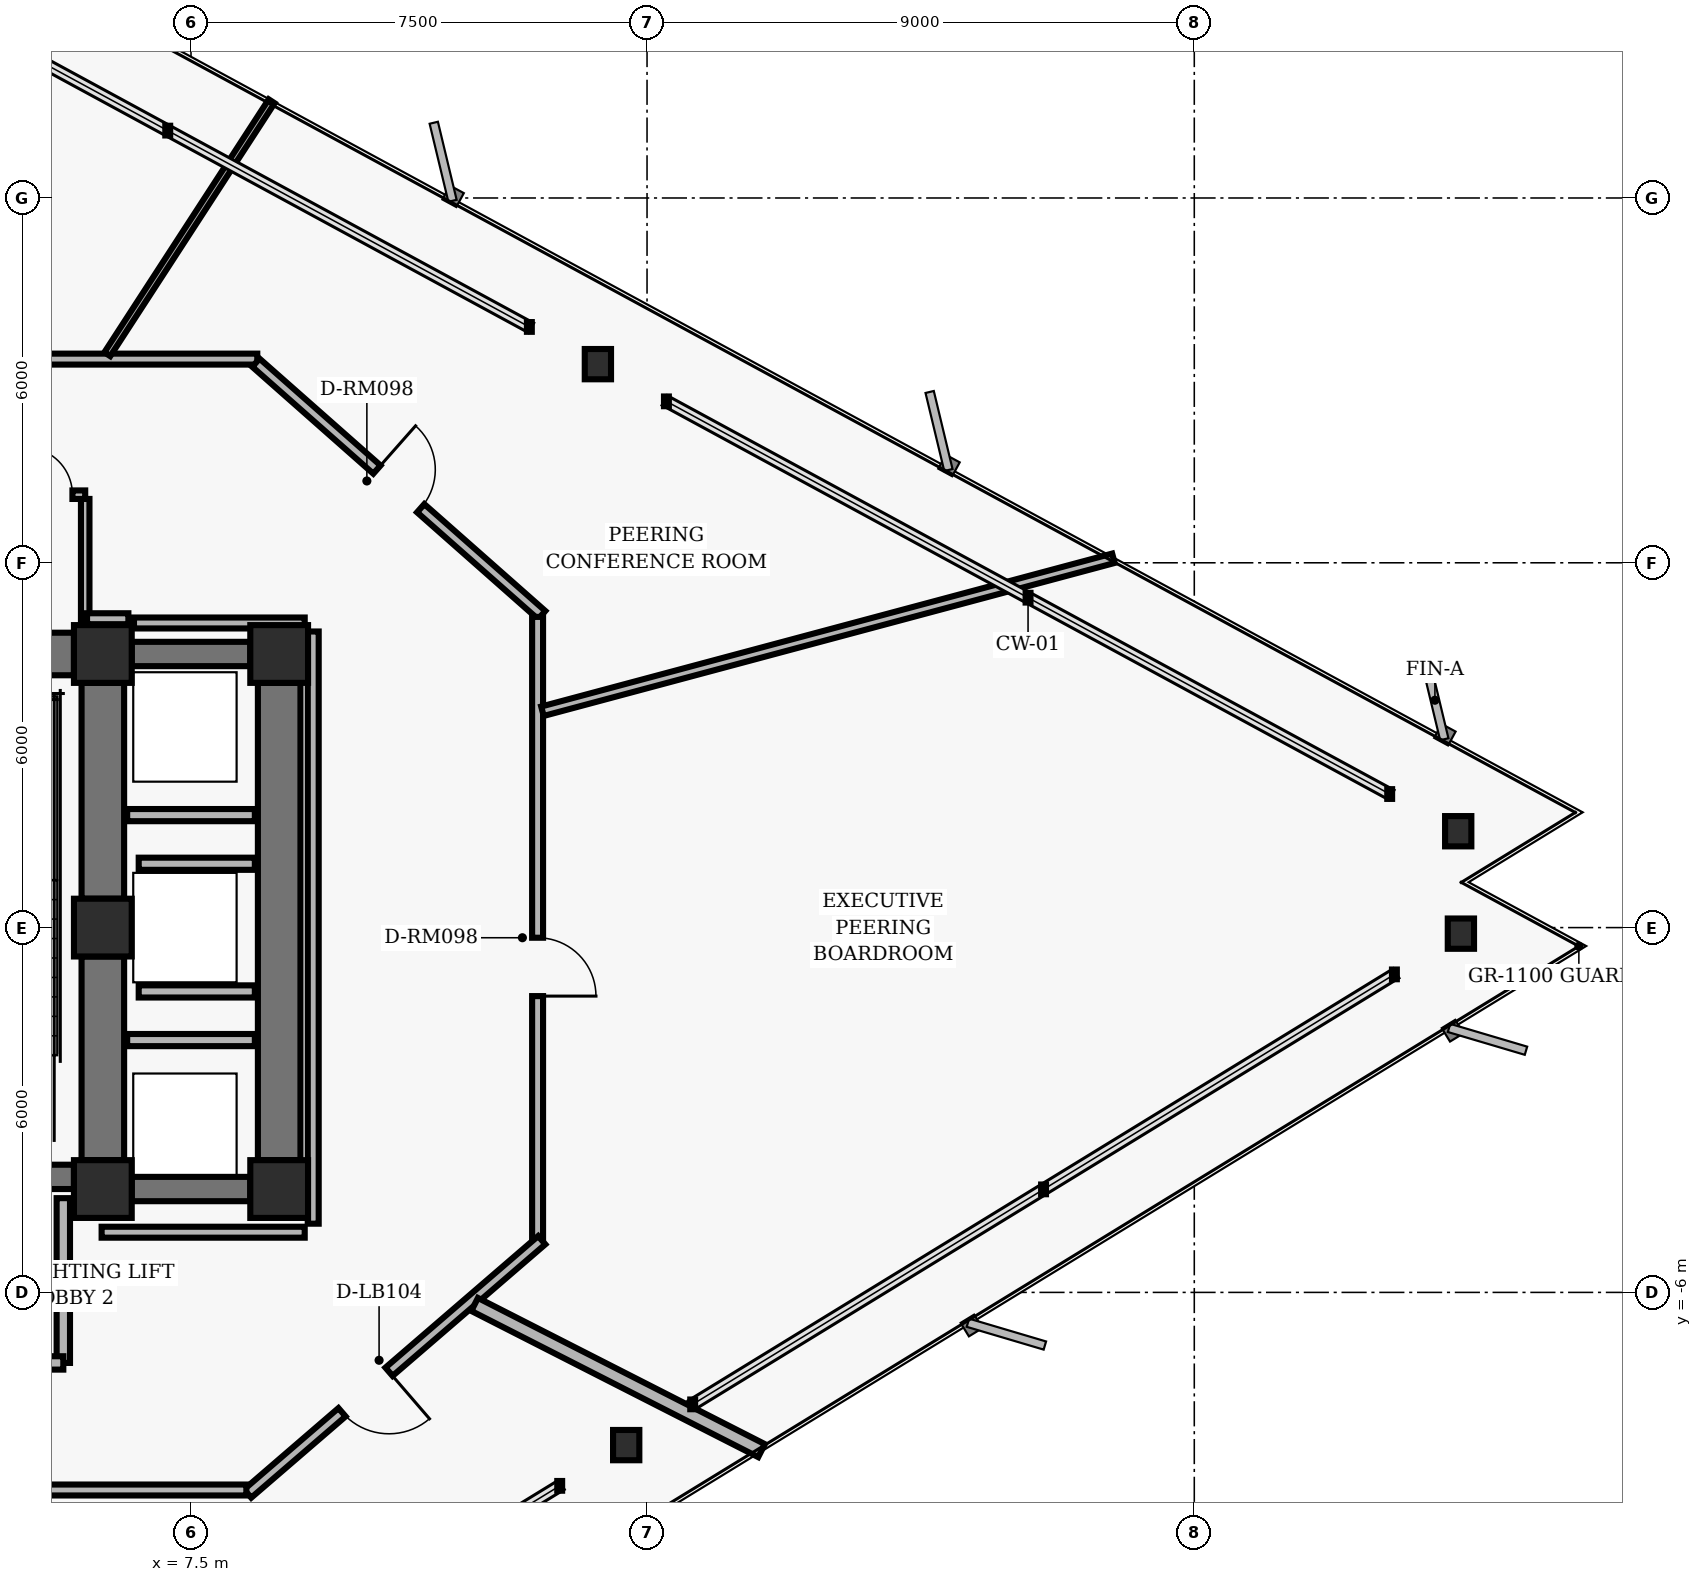
"""IFC4 building model, lengths in metres.
Left out: names, types, materials, properties, quantities, classifications, styles, units other than length and angle.
Written with IfcOpenShell. Run it as: python <this file> out.ifc"""

import sys

from ifc_helpers import new_model, si_unit, direction, frame, frame_2d, origin, origin_2d, place, context, subcontext, project, spatial, rectangle, hollow_rectangle, i_section, extrude, element, fill, save


model = new_model("IFC4")
c1 = context("Model", 3, precision=1e-05, world=origin(), true_north=direction((0.0, 1.0)))
c2 = subcontext(c1, "Body", "Model", "MODEL_VIEW")
j1 = project(units=[si_unit("LENGTHUNIT", "METRE"), si_unit("PLANEANGLEUNIT", "RADIAN")], contexts=[c1])
p1 = place(None, origin())
s1 = spatial("IfcSite", under=j1, at=p1, CompositionType="ELEMENT")
p2 = place(p1, origin())
s2 = spatial("IfcBuilding", under=s1, at=p2, CompositionType="ELEMENT")
p3 = place(p2, frame((0.0, 0.0, 28.96)))
s3 = spatial("IfcBuildingStorey", under=s2, at=p3, CompositionType="ELEMENT", Elevation=28.96)
for number, where, z_axis, x_axis in (
    (1, (6.05, 4.5, 0.0), (0.0, 0.0, 1.0), (1.0, 0.0, 0.0)),
    (2, (6.05, 0.0, 0.0), (0.0, 0.0, 1.0), (1.0, 0.0, 0.0)),
    (3, (6.05, -4.3, 0.0), (0.0, 0.0, 1.0), (1.0, 0.0, 0.0)),
    (4, (8.95, 4.5, 0.0), (0.0, 0.0, 1.0), (1.0, 0.0, 0.0)),
    (5, (8.95, -4.3, 0.0), (0.0, 0.0, 1.0), (1.0, 0.0, 0.0)),
):
    element("IfcColumn", number, at=place(p3, frame(where, z_axis=z_axis, x_axis=x_axis)), inside=s3, PredefinedType="COLUMN", context=c2, shape_type="SweptSolid", body=[
        extrude(hollow_rectangle(XDim=0.95, YDim=0.95, WallThickness=0.06, InnerFilletRadius=0.02, OuterFilletRadius=0.04, at=origin_2d()), origin(), (0.0, 0.0, 1.0), 3.36),
    ])
p4 = place(p3, frame((6.05, 0.475, 0.0), z_axis=(0.0, 0.0, 1.0), x_axis=(0.0, 1.0, 0.0)))
e6 = element("IfcWall", 6, at=p4, inside=s3, PredefinedType="SHEAR", context=c2, shape_type="SweptSolid", body=[
    extrude(rectangle(XDim=3.55, YDim=0.7, at=frame_2d((1.775, 0.0))), origin(), (0.0, 0.0, 1.0), 3.098),
])
p5 = place(p3, frame((6.05, -3.825, 0.0), z_axis=(0.0, 0.0, 1.0), x_axis=(0.0, 1.0, 0.0)))
e7 = element("IfcWall", 7, at=p5, inside=s3, PredefinedType="SHEAR", context=c2, shape_type="SweptSolid", body=[
    extrude(rectangle(XDim=3.35, YDim=0.7, at=frame_2d((1.675, 0.0))), origin(), (0.0, 0.0, 1.0), 3.098),
])
p6 = place(p3, frame((-5.575, -4.1, 0.0), z_axis=(0.0, 0.0, 1.0), x_axis=(1.0, 0.0, 0.0)))
e8 = element("IfcWall", 8, at=p6, inside=s3, PredefinedType="SHEAR", context=c2, shape_type="SweptSolid", body=[
    extrude(rectangle(XDim=11.15, YDim=0.4, at=frame_2d((5.575, 0.0))), origin(), (0.0, 0.0, 1.0), 3.098),
])
p7 = place(p6, frame((1.305, 0.0, 0.0)))
e9 = element("IfcOpeningElement", 9, at=p7, cuts=e8, PredefinedType="OPENING", context=c2, shape_type="SweptSolid", body=[
    extrude(rectangle(XDim=1.1, YDim=2.04, at=frame_2d((0.55, 1.02))), frame((0.0, 0.21, 0.0), z_axis=(0.0, -1.0, 0.0), x_axis=(1.0, 0.0, 0.0)), (0.0, 0.0, 1.0), 0.42),
])
p8 = place(p6, frame((8.745, 0.0, 0.0)))
e10 = element("IfcOpeningElement", 10, at=p8, cuts=e8, PredefinedType="OPENING", context=c2, shape_type="SweptSolid", body=[
    extrude(rectangle(XDim=1.1, YDim=2.04, at=frame_2d((0.55, 1.02))), frame((0.0, 0.21, 0.0), z_axis=(0.0, -1.0, 0.0), x_axis=(1.0, 0.0, 0.0)), (0.0, 0.0, 1.0), 0.42),
])
p9 = place(p6, frame((4.045, 0.0, 0.0)))
e11 = element("IfcOpeningElement", 11, at=p9, cuts=e8, PredefinedType="OPENING", context=c2, shape_type="SweptSolid", body=[
    extrude(rectangle(XDim=1.06, YDim=2.04, at=frame_2d((0.53, 1.02))), frame((0.0, 0.21, 0.0), z_axis=(0.0, -1.0, 0.0), x_axis=(1.0, 0.0, 0.0)), (0.0, 0.0, 1.0), 0.42),
])
p10 = place(p6, frame((6.045, 0.0, 0.0)))
e12 = element("IfcOpeningElement", 12, at=p10, cuts=e8, PredefinedType="OPENING", context=c2, shape_type="SweptSolid", body=[
    extrude(rectangle(XDim=1.06, YDim=2.04, at=frame_2d((0.53, 1.02))), frame((0.0, 0.21, 0.0), z_axis=(0.0, -1.0, 0.0), x_axis=(1.0, 0.0, 0.0)), (0.0, 0.0, 1.0), 0.42),
])
p11 = place(p3, frame((2.05, 4.5, 0.0), z_axis=(0.0, 0.0, 1.0), x_axis=(1.0, 0.0, 0.0)))
e13 = element("IfcWall", 13, at=p11, inside=s3, PredefinedType="SHEAR", context=c2, shape_type="SweptSolid", body=[
    extrude(rectangle(XDim=3.525, YDim=0.7, at=frame_2d((1.762, 0.0))), origin(), (0.0, 0.0, 1.0), 3.098),
])
p12 = place(p3, frame((8.95, -3.825, 0.0), z_axis=(0.0, 0.0, 1.0), x_axis=(0.0, 1.0, 0.0)))
e14 = element("IfcWall", 14, at=p12, inside=s3, PredefinedType="SHEAR", context=c2, shape_type="SweptSolid", body=[
    extrude(rectangle(XDim=7.85, YDim=0.7, at=frame_2d((3.925, 0.0))), origin(), (0.0, 0.0, 1.0), 3.098),
])
for number, where, z_axis, x_axis in (
    (15, (6.525, 4.5, 0.0), (0.0, 0.0, 1.0), (1.0, 0.0, 0.0)),
    (16, (6.525, -4.3, 0.0), (0.0, 0.0, 1.0), (1.0, 0.0, 0.0)),
):
    element("IfcWall", number, at=place(p3, frame(where, z_axis=z_axis, x_axis=x_axis)), inside=s3, PredefinedType="SHEAR", context=c2, shape_type="SweptSolid", body=[
        extrude(rectangle(XDim=1.95, YDim=0.4, at=frame_2d((0.975, 0.0))), origin(), (0.0, 0.0, 1.0), 3.098),
    ])
for number, where, z_axis, x_axis in (
    (17, (28.341, 1.585, 0.0), (0.0, 0.0, 1.0), (1.0, 0.0, 0.0)),
    (18, (14.192, 9.267, 0.0), (0.0, 0.0, 1.0), (1.0, 0.0, 0.0)),
    (19, (14.657, -8.512, 0.0), (0.0, 0.0, 1.0), (1.0, 0.0, 0.0)),
    (20, (28.385, -0.1, 0.0), (0.0, 0.0, 1.0), (1.0, 0.0, 0.0)),
):
    element("IfcColumn", number, at=place(p3, frame(where, z_axis=z_axis, x_axis=x_axis)), inside=s3, PredefinedType="COLUMN", context=c2, shape_type="SweptSolid", body=[
        extrude(i_section(OverallWidth=0.432, OverallDepth=0.498, WebThickness=0.056, FlangeThickness=0.089, FilletRadius=0.025, at=origin_2d()), origin(), (0.0, 0.0, 1.0), 3.36),
    ])
p13 = place(p3, frame((5.4, -7.16, 0.0), z_axis=(0.0, 0.0, 1.0), x_axis=(0.0, 1.0, 0.0)))
e21 = element("IfcWall", 21, at=p13, inside=s3, PredefinedType="PARTITIONING", context=c2, shape_type="SweptSolid", body=[
    extrude(rectangle(XDim=2.71, YDim=0.22, at=frame_2d((1.355, 0.0))), origin(), (0.0, 0.0, 1.0), 3.073),
])
p14 = place(p3, frame((0.0, -7.16, 0.0), z_axis=(0.0, 0.0, 1.0), x_axis=(1.0, 0.0, 0.0)))
e22 = element("IfcWall", 22, at=p14, inside=s3, PredefinedType="PARTITIONING", context=c2, shape_type="SweptSolid", body=[
    extrude(rectangle(XDim=5.4, YDim=0.22, at=frame_2d((2.7, 0.0))), origin(), (0.0, 0.0, 1.0), 3.073),
])
p15 = place(p14, frame((2.05, 0.0, 0.0)))
e23 = element("IfcOpeningElement", 23, at=p15, cuts=e22, PredefinedType="OPENING", context=c2, shape_type="SweptSolid", body=[
    extrude(rectangle(XDim=1.12, YDim=2.02, at=frame_2d((0.56, 1.01))), frame((0.0, 0.12, 0.0), z_axis=(0.0, -1.0, 0.0), x_axis=(1.0, 0.0, 0.0)), (0.0, 0.0, 1.0), 0.24),
])
p16 = place(p3, frame((5.76, 4.95, 0.0), z_axis=(0.0, 0.0, 1.0), x_axis=(0.0, 1.0, 0.0)))
e24 = element("IfcWall", 24, at=p16, inside=s3, PredefinedType="PARTITIONING", context=c2, shape_type="SweptSolid", body=[
    extrude(rectangle(XDim=2.1, YDim=0.14, at=frame_2d((1.05, 0.0))), origin(), (0.0, 0.0, 1.0), 3.073),
])
p17 = place(p3, frame((4.56, 7.12, 0.0), z_axis=(0.0, 0.0, 1.0), x_axis=(1.0, 0.0, 0.0)))
e25 = element("IfcWall", 25, at=p17, inside=s3, PredefinedType="PARTITIONING", context=c2, shape_type="SweptSolid", body=[
    extrude(rectangle(XDim=1.2, YDim=0.14, at=frame_2d((0.6, 0.0))), origin(), (0.0, 0.0, 1.0), 3.073),
])
p18 = place(p17, frame((0.21, 0.0, 0.0)))
e26 = element("IfcOpeningElement", 26, at=p18, cuts=e25, PredefinedType="OPENING", context=c2, shape_type="SweptSolid", body=[
    extrude(rectangle(XDim=0.78, YDim=2.01, at=frame_2d((0.39, 1.005))), frame((0.0, 0.08, 0.0), z_axis=(0.0, -1.0, 0.0), x_axis=(1.0, 0.0, 0.0)), (0.0, 0.0, 1.0), 0.16),
])
for number, where, z_axis, x_axis in (
    (27, (6.45, -1.85, 0.0), (0.0, 0.0, 1.0), (1.0, 0.0, 0.0)),
    (28, (6.45, 1.85, 0.0), (0.0, 0.0, 1.0), (1.0, 0.0, 0.0)),
):
    element("IfcWall", number, at=place(p3, frame(where, z_axis=z_axis, x_axis=x_axis)), inside=s3, PredefinedType="PARTITIONING", context=c2, shape_type="SweptSolid", body=[
        extrude(rectangle(XDim=2.1, YDim=0.2, at=frame_2d((1.05, 0.0))), origin(), (0.0, 0.0, 1.0), 3.073),
    ])
for number, where, z_axis, x_axis in (
    (29, (6.64, -1.05, 0.0), (0.0, 0.0, 1.0), (1.0, 0.0, 0.0)),
    (30, (6.64, 1.05, 0.0), (0.0, 0.0, 1.0), (1.0, 0.0, 0.0)),
):
    element("IfcWall", number, at=place(p3, frame(where, z_axis=z_axis, x_axis=x_axis)), inside=s3, PredefinedType="PARTITIONING", context=c2, shape_type="SweptSolid", body=[
        extrude(rectangle(XDim=1.91, YDim=0.2, at=frame_2d((0.955, 0.0))), origin(), (0.0, 0.0, 1.0), 3.073),
    ])
p19 = place(p3, frame((-8.59, 9.35, 0.0), z_axis=(0.0, 0.0, 1.0), x_axis=(1.0, 0.0, 0.0)))
e31 = element("IfcWall", 31, at=p19, inside=s3, PredefinedType="PARTITIONING", context=c2, shape_type="SweptSolid", body=[
    extrude(rectangle(XDim=17.18, YDim=0.18, at=frame_2d((8.59, 0.0))), origin(), (0.0, 0.0, 1.0), 2.587),
])
p20 = place(p19, frame((10.43, 0.0, 0.0)))
e32 = element("IfcOpeningElement", 32, at=p20, cuts=e31, PredefinedType="OPENING", context=c2, shape_type="SweptSolid", body=[
    extrude(rectangle(XDim=0.96, YDim=2.02, at=frame_2d((0.48, 1.01))), frame((0.0, 0.1, 0.0), z_axis=(0.0, -1.0, 0.0), x_axis=(1.0, 0.0, 0.0)), (0.0, 0.0, 1.0), 0.2),
])
p21 = place(p19, frame((3.198, 0.0, 0.0)))
e33 = element("IfcOpeningElement", 33, at=p21, cuts=e31, PredefinedType="OPENING", context=c2, shape_type="SweptSolid", body=[
    extrude(rectangle(XDim=0.96, YDim=2.02, at=frame_2d((0.48, 1.01))), frame((0.0, 0.1, 0.0), z_axis=(0.0, -1.0, 0.0), x_axis=(1.0, 0.0, 0.0)), (0.0, 0.0, 1.0), 0.2),
])
p22 = place(p3, frame((8.567, 9.29, 0.0), z_axis=(0.0, 0.0, 1.0), x_axis=(0.749626463267, -0.66186113768, 0.0)))
e34 = element("IfcWall", 34, at=p22, inside=s3, PredefinedType="PARTITIONING", context=c2, shape_type="SweptSolid", body=[
    extrude(rectangle(XDim=6.27, YDim=0.18, at=frame_2d((3.135, 0.0))), origin(), (0.0, 0.0, 1.0), 2.587),
])
p23 = place(p22, frame((2.655, 0.0, 0.0)))
e35 = element("IfcOpeningElement", 35, at=p23, cuts=e34, PredefinedType="OPENING", context=c2, shape_type="SweptSolid", body=[
    extrude(rectangle(XDim=0.96, YDim=2.02, at=frame_2d((0.48, 1.01))), frame((0.0, 0.1, 0.0), z_axis=(0.0, -1.0, 0.0), x_axis=(1.0, 0.0, 0.0)), (0.0, 0.0, 1.0), 0.2),
])
p24 = place(p3, frame((13.2, 5.11, 0.0), z_axis=(0.0, 0.0, 1.0), x_axis=(0.0, -1.0, 0.0)))
e36 = element("IfcWall", 36, at=p24, inside=s3, PredefinedType="PARTITIONING", context=c2, shape_type="SweptSolid", body=[
    extrude(rectangle(XDim=10.22, YDim=0.18, at=frame_2d((5.11, 0.0))), origin(), (0.0, 0.0, 1.0), 3.073),
])
p25 = place(p24, frame((5.277, 0.0, 0.0)))
e37 = element("IfcOpeningElement", 37, at=p25, cuts=e36, PredefinedType="OPENING", context=c2, shape_type="SweptSolid", body=[
    extrude(rectangle(XDim=0.96, YDim=2.02, at=frame_2d((0.48, 1.01))), frame((0.0, 0.1, 0.0), z_axis=(0.0, -1.0, 0.0), x_axis=(1.0, 0.0, 0.0)), (0.0, 0.0, 1.0), 0.2),
])
p26 = place(p3, frame((13.268, -5.141, 0.0), z_axis=(0.0, 0.0, 1.0), x_axis=(-0.757534501725, -0.65279512766, 0.0)))
e38 = element("IfcWall", 38, at=p26, inside=s3, PredefinedType="PARTITIONING", context=c2, shape_type="SweptSolid", body=[
    extrude(rectangle(XDim=6.385, YDim=0.18, at=frame_2d((3.192, 0.0))), origin(), (0.0, 0.0, 1.0), 2.587),
])
p27 = place(p26, frame((3.316, 0.0, 0.0)))
e39 = element("IfcOpeningElement", 39, at=p27, cuts=e38, PredefinedType="OPENING", context=c2, shape_type="SweptSolid", body=[
    extrude(rectangle(XDim=1.02, YDim=2.02, at=frame_2d((0.51, 1.01))), frame((0.0, 0.1, 0.0), z_axis=(0.0, -1.0, 0.0), x_axis=(1.0, 0.0, 0.0)), (0.0, 0.0, 1.0), 0.2),
])
p28 = place(p3, frame((8.41, -9.25, 0.0), z_axis=(0.0, 0.0, 1.0), x_axis=(-1.0, 0.0, 0.0)))
e40 = element("IfcWall", 40, at=p28, inside=s3, PredefinedType="PARTITIONING", context=c2, shape_type="SweptSolid", body=[
    extrude(rectangle(XDim=17.0, YDim=0.18, at=frame_2d((8.5, 0.0))), origin(), (0.0, 0.0, 1.0), 2.587),
])
p29 = place(p28, frame((13.703, 0.0, 0.0)))
e41 = element("IfcOpeningElement", 41, at=p29, cuts=e40, PredefinedType="OPENING", context=c2, shape_type="SweptSolid", body=[
    extrude(rectangle(XDim=0.96, YDim=2.02, at=frame_2d((0.48, 1.01))), frame((0.0, 0.1, 0.0), z_axis=(0.0, -1.0, 0.0), x_axis=(1.0, 0.0, 0.0)), (0.0, 0.0, 1.0), 0.2),
])
p30 = place(p28, frame((7.745, 0.0, 0.0)))
e42 = element("IfcOpeningElement", 42, at=p30, cuts=e40, PredefinedType="OPENING", context=c2, shape_type="SweptSolid", body=[
    extrude(rectangle(XDim=0.96, YDim=2.02, at=frame_2d((0.48, 1.01))), frame((0.0, 0.1, 0.0), z_axis=(0.0, -1.0, 0.0), x_axis=(1.0, 0.0, 0.0)), (0.0, 0.0, 1.0), 0.2),
])
p31 = place(p3, frame((6.03, -5.01, 0.0), z_axis=(0.0, 0.0, 1.0), x_axis=(1.0, 0.0, 0.0)))
e43 = element("IfcWall", 43, at=p31, inside=s3, PredefinedType="PARTITIONING", context=c2, shape_type="SweptSolid", body=[
    extrude(rectangle(XDim=3.34, YDim=0.18, at=frame_2d((1.67, 0.0))), origin(), (0.0, 0.0, 1.0), 3.073),
])
p32 = place(p3, frame((9.51, -4.87, 0.0), z_axis=(0.0, 0.0, 1.0), x_axis=(0.0, 1.0, 0.0)))
e44 = element("IfcWall", 44, at=p32, inside=s3, PredefinedType="PARTITIONING", context=c2, shape_type="SweptSolid", body=[
    extrude(rectangle(XDim=9.74, YDim=0.18, at=frame_2d((4.87, 0.0))), origin(), (0.0, 0.0, 1.0), 3.073),
])
p33 = place(p3, frame((9.37, 5.01, 0.0), z_axis=(0.0, 0.0, 1.0), x_axis=(-1.0, 0.0, 0.0)))
e45 = element("IfcWall", 45, at=p33, inside=s3, PredefinedType="PARTITIONING", context=c2, shape_type="SweptSolid", body=[
    extrude(rectangle(XDim=2.808, YDim=0.18, at=frame_2d((1.404, 0.0))), origin(), (0.0, 0.0, 1.0), 3.073),
])
p34 = place(p3, frame((6.47, 5.08, 0.0), z_axis=(0.0, 0.0, 1.0), x_axis=(-1.0, 0.0, 0.0)))
e46 = element("IfcWall", 46, at=p34, inside=s3, PredefinedType="PARTITIONING", context=c2, shape_type="SweptSolid", body=[
    extrude(rectangle(XDim=0.68, YDim=0.18, at=frame_2d((0.34, 0.0))), origin(), (0.0, 0.0, 1.0), 3.073),
])
p35 = place(p3, frame((3.582, -9.33, 0.0), z_axis=(0.0, 0.0, 1.0), x_axis=(0.358341066906, -0.933590745332, 0.0)))
e47 = element("IfcWall", 47, at=p35, inside=s3, PredefinedType="MOVABLE", context=c2, shape_type="SweptSolid", body=[
    extrude(rectangle(XDim=6.437, YDim=0.115, at=frame_2d((3.219, 0.0))), origin(), (0.0, 0.0, 1.0), 3.073),
])
p36 = place(p3, frame((12.164, -6.198, 0.0), z_axis=(0.0, 0.0, 1.0), x_axis=(0.890999034188, -0.454005199394, 0.0)))
e48 = element("IfcWall", 48, at=p36, inside=s3, PredefinedType="PARTITIONING", context=c2, shape_type="SweptSolid", body=[
    extrude(rectangle(XDim=5.296, YDim=0.24, at=frame_2d((2.648, 0.0))), origin(), (0.0, 0.0, 1.0), 2.358),
])
p37 = place(p3, frame((13.28, 3.558, 0.0), z_axis=(0.0, 0.0, 1.0), x_axis=(0.965926641133, 0.258816004043, 0.0)))
e49 = element("IfcWall", 49, at=p37, inside=s3, PredefinedType="PARTITIONING", context=c2, shape_type="SweptSolid", body=[
    extrude(rectangle(XDim=9.722, YDim=0.16, at=frame_2d((4.861, 0.0))), origin(), (0.0, 0.0, 1.0), 3.073),
])
p38 = place(p3, frame((6.124, 9.43, 0.0), z_axis=(0.0, 0.0, 1.0), x_axis=(0.544668366902, 0.838651518866, 0.0)))
e50 = element("IfcWall", 50, at=p38, inside=s3, PredefinedType="MOVABLE", context=c2, shape_type="SweptSolid", body=[
    extrude(rectangle(XDim=4.962, YDim=0.115, at=frame_2d((2.481, 0.0))), origin(), (0.0, 0.0, 1.0), 3.073),
])
p39 = place(p18, origin())
e51 = element("IfcDoor", 51, at=p39, inside=s3, OperationType="SINGLE_SWING_LEFT", PredefinedType="DOOR", context=c2, shape_type="SweptSolid", body=[
    extrude(rectangle(XDim=0.78, YDim=2.01, at=frame_2d((0.39, 1.005))), frame((0.0, 0.025, 0.0), z_axis=(0.0, -1.0, 0.0), x_axis=(1.0, 0.0, 0.0)), (0.0, 0.0, 1.0), 0.05),
])
fill(e26, e51)
p40 = place(p27, origin())
e52 = element("IfcDoor", 52, at=p40, inside=s3, OperationType="SINGLE_SWING_LEFT", PredefinedType="DOOR", context=c2, shape_type="SweptSolid", body=[
    extrude(rectangle(XDim=1.02, YDim=2.02, at=frame_2d((0.51, 1.01))), frame((0.0, 0.025, 0.0), z_axis=(0.0, -1.0, 0.0), x_axis=(1.0, 0.0, 0.0)), (0.0, 0.0, 1.0), 0.05),
])
fill(e39, e52)
p41 = place(p25, origin())
e53 = element("IfcDoor", 53, at=p41, inside=s3, OperationType="SINGLE_SWING_RIGHT", PredefinedType="DOOR", context=c2, shape_type="SweptSolid", body=[
    extrude(rectangle(XDim=0.96, YDim=2.02, at=frame_2d((0.48, 1.01))), frame((0.0, 0.025, 0.0), z_axis=(0.0, -1.0, 0.0), x_axis=(1.0, 0.0, 0.0)), (0.0, 0.0, 1.0), 0.05),
])
fill(e37, e53)
p42 = place(p23, origin())
e54 = element("IfcDoor", 54, at=p42, inside=s3, OperationType="SINGLE_SWING_LEFT", PredefinedType="DOOR", context=c2, shape_type="SweptSolid", body=[
    extrude(rectangle(XDim=0.96, YDim=2.02, at=frame_2d((0.48, 1.01))), frame((0.0, 0.025, 0.0), z_axis=(0.0, -1.0, 0.0), x_axis=(1.0, 0.0, 0.0)), (0.0, 0.0, 1.0), 0.05),
])
fill(e35, e54)
save(model, sys.argv[1])
